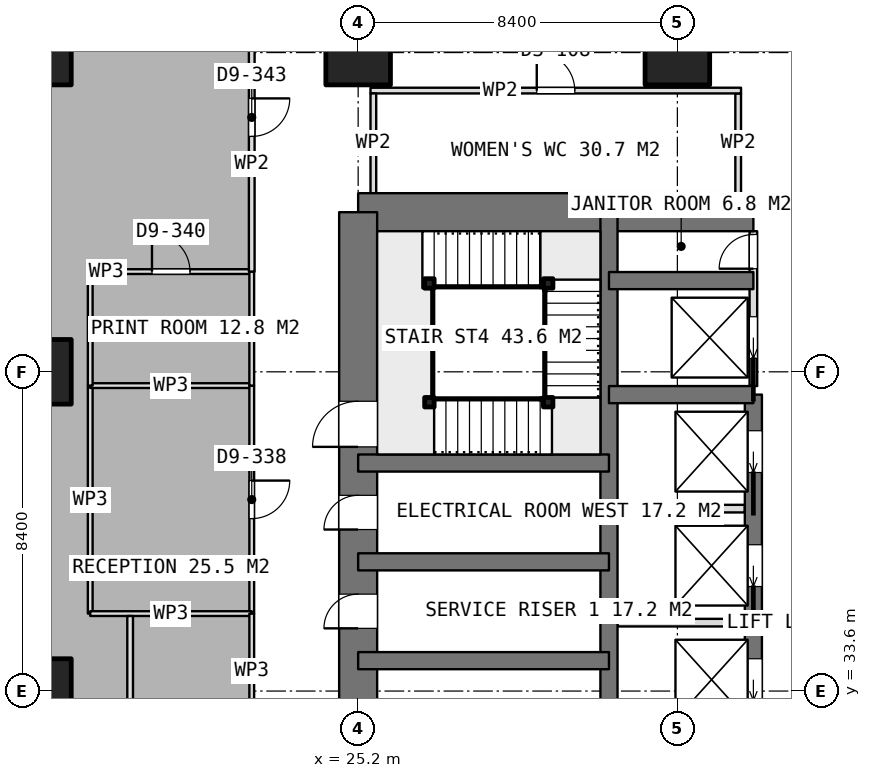
"""IFC4 building model, lengths in metres.
Left out: names, types, materials, properties, quantities, classifications, styles, units other than length and angle.
Written with IfcOpenShell. Run it as: python <this file> out.ifc"""

import sys

from ifc_helpers import new_model, si_unit, direction, frame, frame_2d, origin, origin_2d, place, context, subcontext, project, spatial, rectangle, extrude, element, fill, save


model = new_model("IFC4")
c1 = context("Model", 3, precision=1e-05, world=origin(), true_north=direction((0.0, 1.0)))
c2 = subcontext(c1, "Body", "Model", "MODEL_VIEW")
j1 = project(units=[si_unit("LENGTHUNIT", "METRE"), si_unit("PLANEANGLEUNIT", "RADIAN")], contexts=[c1])
p1 = place(None, origin())
s1 = spatial("IfcSite", under=j1, at=p1, CompositionType="ELEMENT")
p2 = place(p1, origin())
s2 = spatial("IfcBuilding", under=s1, at=p2, CompositionType="ELEMENT")
p3 = place(p2, frame((0.0, 0.0, 102.8)))
s3 = spatial("IfcBuildingStorey", under=s2, at=p3, CompositionType="ELEMENT", Elevation=102.8)
p4 = place(p3, frame((25.2, 46.2, 0.0), z_axis=(0.0, 0.0, 1.0), x_axis=(1.0, 0.0, 0.0)))
e1 = element("IfcWall", 1, at=p4, inside=s3, PredefinedType="SHEAR", context=c2, shape_type="SweptSolid", body=[
    extrude(rectangle(XDim=10.4, YDim=1.0, at=frame_2d((5.2, 0.0))), origin(), (0.0, 0.0, 1.0), 3.75),
])
p5 = place(p3, frame((25.2, 21.0, 0.0), z_axis=(0.0, 0.0, 1.0), x_axis=(0.0, 1.0, 0.0)))
e2 = element("IfcWall", 2, at=p5, inside=s3, PredefinedType="SHEAR", context=c2, shape_type="SweptSolid", body=[
    extrude(rectangle(XDim=25.2, YDim=1.0, at=frame_2d((12.6, 0.0))), origin(), (0.0, 0.0, 1.0), 3.75),
])
p6 = place(p5, frame((7.8, 0.0, 0.0)))
e3 = element("IfcOpeningElement", 3, at=p6, cuts=e2, PredefinedType="OPENING", context=c2, shape_type="SweptSolid", body=[
    extrude(rectangle(XDim=1.2, YDim=2.1, at=frame_2d((0.6, 1.05))), frame((0.0, 0.51, 0.0), z_axis=(0.0, -1.0, 0.0), x_axis=(1.0, 0.0, 0.0)), (0.0, 0.0, 1.0), 1.02),
])
p7 = place(p5, frame((14.25, 0.0, 0.0)))
e4 = element("IfcOpeningElement", 4, at=p7, cuts=e2, PredefinedType="OPENING", context=c2, shape_type="SweptSolid", body=[
    extrude(rectangle(XDim=0.9, YDim=2.1, at=frame_2d((0.45, 1.05))), frame((0.0, 0.51, 0.0), z_axis=(0.0, -1.0, 0.0), x_axis=(1.0, 0.0, 0.0)), (0.0, 0.0, 1.0), 1.02),
])
p8 = place(p5, frame((16.85, 0.0, 0.0)))
e5 = element("IfcOpeningElement", 5, at=p8, cuts=e2, PredefinedType="OPENING", context=c2, shape_type="SweptSolid", body=[
    extrude(rectangle(XDim=0.9, YDim=2.1, at=frame_2d((0.45, 1.05))), frame((0.0, 0.51, 0.0), z_axis=(0.0, -1.0, 0.0), x_axis=(1.0, 0.0, 0.0)), (0.0, 0.0, 1.0), 1.02),
])
p9 = place(p5, frame((19.025, 0.0, 0.0)))
e6 = element("IfcOpeningElement", 6, at=p9, cuts=e2, PredefinedType="OPENING", context=c2, shape_type="SweptSolid", body=[
    extrude(rectangle(XDim=1.2, YDim=2.1, at=frame_2d((0.6, 1.05))), frame((0.0, 0.51, 0.0), z_axis=(0.0, -1.0, 0.0), x_axis=(1.0, 0.0, 0.0)), (0.0, 0.0, 1.0), 1.02),
])
p10 = place(p3, frame((31.8, 21.0, 0.0), z_axis=(0.0, 0.0, 1.0), x_axis=(0.0, 1.0, 0.0)))
e7 = element("IfcWall", 7, at=p10, inside=s3, PredefinedType="SHEAR", context=c2, shape_type="SweptSolid", body=[
    extrude(rectangle(XDim=25.2, YDim=0.45, at=frame_2d((12.6, 0.0))), origin(), (0.0, 0.0, 1.0), 3.75),
])
p11 = place(p3, frame((35.6, 23.4, 0.0), z_axis=(0.0, 0.0, 1.0), x_axis=(0.0, 1.0, 0.0)))
e8 = element("IfcWall", 8, at=p11, inside=s3, PredefinedType="SHEAR", context=c2, shape_type="SweptSolid", body=[
    extrude(rectangle(XDim=18.0, YDim=0.45, at=frame_2d((9.0, 0.0))), origin(), (0.0, 0.0, 1.0), 3.75),
])
p12 = place(p11, frame((0.95, 0.0, 0.0)))
e9 = element("IfcOpeningElement", 9, at=p12, cuts=e8, PredefinedType="OPENING", context=c2, shape_type="SweptSolid", body=[
    extrude(rectangle(XDim=1.1, YDim=2.1, at=frame_2d((0.55, 1.05))), frame((0.0, 0.235, 0.0), z_axis=(0.0, -1.0, 0.0), x_axis=(1.0, 0.0, 0.0)), (0.0, 0.0, 1.0), 0.47),
])
p13 = place(p11, frame((3.95, 0.0, 0.0)))
e10 = element("IfcOpeningElement", 10, at=p13, cuts=e8, PredefinedType="OPENING", context=c2, shape_type="SweptSolid", body=[
    extrude(rectangle(XDim=1.1, YDim=2.1, at=frame_2d((0.55, 1.05))), frame((0.0, 0.235, 0.0), z_axis=(0.0, -1.0, 0.0), x_axis=(1.0, 0.0, 0.0)), (0.0, 0.0, 1.0), 0.47),
])
p14 = place(p11, frame((6.95, 0.0, 0.0)))
e11 = element("IfcOpeningElement", 11, at=p14, cuts=e8, PredefinedType="OPENING", context=c2, shape_type="SweptSolid", body=[
    extrude(rectangle(XDim=1.1, YDim=2.1, at=frame_2d((0.55, 1.05))), frame((0.0, 0.235, 0.0), z_axis=(0.0, -1.0, 0.0), x_axis=(1.0, 0.0, 0.0)), (0.0, 0.0, 1.0), 0.47),
])
p15 = place(p11, frame((9.95, 0.0, 0.0)))
e12 = element("IfcOpeningElement", 12, at=p15, cuts=e8, PredefinedType="OPENING", context=c2, shape_type="SweptSolid", body=[
    extrude(rectangle(XDim=1.1, YDim=2.1, at=frame_2d((0.55, 1.05))), frame((0.0, 0.235, 0.0), z_axis=(0.0, -1.0, 0.0), x_axis=(1.0, 0.0, 0.0)), (0.0, 0.0, 1.0), 0.47),
])
p16 = place(p11, frame((12.95, 0.0, 0.0)))
e13 = element("IfcOpeningElement", 13, at=p16, cuts=e8, PredefinedType="OPENING", context=c2, shape_type="SweptSolid", body=[
    extrude(rectangle(XDim=1.1, YDim=2.1, at=frame_2d((0.55, 1.05))), frame((0.0, 0.235, 0.0), z_axis=(0.0, -1.0, 0.0), x_axis=(1.0, 0.0, 0.0)), (0.0, 0.0, 1.0), 0.47),
])
p17 = place(p11, frame((15.95, 0.0, 0.0)))
e14 = element("IfcOpeningElement", 14, at=p17, cuts=e8, PredefinedType="OPENING", context=c2, shape_type="SweptSolid", body=[
    extrude(rectangle(XDim=1.1, YDim=2.1, at=frame_2d((0.55, 1.05))), frame((0.0, 0.235, 0.0), z_axis=(0.0, -1.0, 0.0), x_axis=(1.0, 0.0, 0.0)), (0.0, 0.0, 1.0), 0.47),
])
for number, where, z_axis, x_axis in (
    (15, (31.8, 41.4, 0.0), (0.0, 0.0, 1.0), (1.0, 0.0, 0.0)),
    (16, (31.8, 44.4, 0.0), (0.0, 0.0, 1.0), (1.0, 0.0, 0.0)),
):
    element("IfcWall", number, at=place(p3, frame(where, z_axis=z_axis, x_axis=x_axis)), inside=s3, PredefinedType="SHEAR", context=c2, shape_type="SweptSolid", body=[
        extrude(rectangle(XDim=3.8, YDim=0.45, at=frame_2d((1.9, 0.0))), origin(), (0.0, 0.0, 1.0), 3.75),
    ])
for number, where, z_axis, x_axis in (
    (17, (25.2, 34.4, 0.0), (0.0, 0.0, 1.0), (1.0, 0.0, 0.0)),
    (18, (25.2, 37.0, 0.0), (0.0, 0.0, 1.0), (1.0, 0.0, 0.0)),
    (19, (25.2, 39.6, 0.0), (0.0, 0.0, 1.0), (1.0, 0.0, 0.0)),
):
    element("IfcWall", number, at=place(p3, frame(where, z_axis=z_axis, x_axis=x_axis)), inside=s3, PredefinedType="SHEAR", context=c2, shape_type="SweptSolid", body=[
        extrude(rectangle(XDim=6.6, YDim=0.45, at=frame_2d((3.3, 0.0))), origin(), (0.0, 0.0, 1.0), 3.75),
    ])
for number, where, z_axis, x_axis in (
    (20, (16.8, 33.6, 0.0), (0.0, 0.0, 1.0), (1.0, 0.0, 0.0)),
    (21, (16.8, 42.0, 0.0), (0.0, 0.0, 1.0), (1.0, 0.0, 0.0)),
    (22, (16.8, 50.4, 0.0), (0.0, 0.0, 1.0), (1.0, 0.0, 0.0)),
    (23, (25.2, 50.4, 0.0), (0.0, 0.0, 1.0), (1.0, 0.0, 0.0)),
    (24, (33.6, 50.4, 0.0), (0.0, 0.0, 1.0), (1.0, 0.0, 0.0)),
):
    element("IfcColumn", number, at=place(p3, frame(where, z_axis=z_axis, x_axis=x_axis)), inside=s3, PredefinedType="COLUMN", context=c2, shape_type="SweptSolid", body=[
        extrude(rectangle(XDim=1.7, YDim=1.7, at=origin_2d()), origin(), (0.0, 0.0, 1.0), 3.75),
    ])
for number, where, z_axis, x_axis in (
    (25, (32.025, 35.4, 0.0), (0.0, 0.0, 1.0), (1.0, 0.0, 0.0)),
    (26, (32.025, 38.4, 0.0), (0.0, 0.0, 1.0), (1.0, 0.0, 0.0)),
):
    element("IfcWall", number, at=place(p3, frame(where, z_axis=z_axis, x_axis=x_axis)), inside=s3, PredefinedType="PARTITIONING", context=c2, shape_type="SweptSolid", body=[
        extrude(rectangle(XDim=3.35, YDim=0.2, at=frame_2d((1.675, 0.0))), origin(), (0.0, 0.0, 1.0), 3.5),
    ])
p18 = place(p3, frame((35.6, 41.625, 0.0), z_axis=(0.0, 0.0, 1.0), x_axis=(0.0, 1.0, 0.0)))
e27 = element("IfcWall", 27, at=p18, inside=s3, PredefinedType="PARTITIONING", context=c2, shape_type="SweptSolid", body=[
    extrude(rectangle(XDim=4.075, YDim=0.2, at=frame_2d((2.038, 0.0))), origin(), (0.0, 0.0, 1.0), 3.5),
])
p19 = place(p18, frame((3.088, 0.0, 0.0)))
e28 = element("IfcOpeningElement", 28, at=p19, cuts=e27, PredefinedType="OPENING", context=c2, shape_type="SweptSolid", body=[
    extrude(rectangle(XDim=0.9, YDim=2.1, at=frame_2d((0.45, 1.05))), frame((0.0, 0.11, 0.0), z_axis=(0.0, -1.0, 0.0), x_axis=(1.0, 0.0, 0.0)), (0.0, 0.0, 1.0), 0.22),
])
p20 = place(p18, frame((0.725, 0.0, 0.0)))
e29 = element("IfcOpeningElement", 29, at=p20, cuts=e27, PredefinedType="OPENING", context=c2, shape_type="SweptSolid", body=[
    extrude(rectangle(XDim=1.1, YDim=2.1, at=frame_2d((0.55, 1.05))), frame((0.0, 0.11, 0.0), z_axis=(0.0, -1.0, 0.0), x_axis=(1.0, 0.0, 0.0)), (0.0, 0.0, 1.0), 0.22),
])
p21 = place(p3, frame((25.525, 49.4, 0.0), z_axis=(0.0, 0.0, 1.0), x_axis=(1.0, 0.0, 0.0)))
e30 = element("IfcWall", 30, at=p21, inside=s3, PredefinedType="PARTITIONING", context=c2, shape_type="SweptSolid", body=[
    extrude(rectangle(XDim=9.75, YDim=0.15, at=frame_2d((4.875, 0.0))), origin(), (0.0, 0.0, 1.0), 3.5),
])
p22 = place(p21, frame((4.375, 0.0, 0.0)))
e31 = element("IfcOpeningElement", 31, at=p22, cuts=e30, PredefinedType="OPENING", context=c2, shape_type="SweptSolid", body=[
    extrude(rectangle(XDim=1.0, YDim=2.1, at=frame_2d((0.5, 1.05))), frame((0.0, 0.085, 0.0), z_axis=(0.0, -1.0, 0.0), x_axis=(1.0, 0.0, 0.0)), (0.0, 0.0, 1.0), 0.17),
])
for number, where, z_axis, x_axis in (
    (32, (25.6, 46.7, 0.0), (0.0, 0.0, 1.0), (0.0, 1.0, 0.0)),
    (33, (35.2, 46.7, 0.0), (0.0, 0.0, 1.0), (0.0, 1.0, 0.0)),
):
    element("IfcWall", number, at=place(p3, frame(where, z_axis=z_axis, x_axis=x_axis)), inside=s3, PredefinedType="PARTITIONING", context=c2, shape_type="SweptSolid", body=[
        extrude(rectangle(XDim=2.625, YDim=0.15, at=frame_2d((1.312, 0.0))), origin(), (0.0, 0.0, 1.0), 3.5),
    ])
p23 = place(p3, frame((18.15, 35.638, 0.0), z_axis=(0.0, 0.0, 1.0), x_axis=(0.0, 1.0, 0.0)))
e34 = element("IfcWall", 34, at=p23, inside=s3, PredefinedType="PARTITIONING", context=c2, shape_type="SweptSolid", body=[
    extrude(rectangle(XDim=5.999, YDim=0.125, at=frame_2d((3.0, 0.0))), origin(), (0.0, 0.0, 1.0), 3.5),
])
p24 = place(p3, frame((18.15, 41.637, 0.0), z_axis=(0.0, 0.0, 1.0), x_axis=(1.0, 0.0, 0.0)))
e35 = element("IfcWall", 35, at=p24, inside=s3, PredefinedType="PARTITIONING", context=c2, shape_type="SweptSolid", body=[
    extrude(rectangle(XDim=4.25, YDim=0.125, at=frame_2d((2.125, 0.0))), origin(), (0.0, 0.0, 1.0), 3.5),
])
p25 = place(p3, frame((22.4, 41.637, 0.0), z_axis=(0.0, 0.0, 1.0), x_axis=(0.0, -1.0, 0.0)))
e36 = element("IfcWall", 36, at=p25, inside=s3, PredefinedType="PARTITIONING", context=c2, shape_type="SweptSolid", body=[
    extrude(rectangle(XDim=5.999, YDim=0.125, at=frame_2d((3.0, 0.0))), origin(), (0.0, 0.0, 1.0), 3.5),
])
p26 = place(p25, frame((2.499, 0.0, 0.0)))
e37 = element("IfcOpeningElement", 37, at=p26, cuts=e36, PredefinedType="OPENING", context=c2, shape_type="SweptSolid", body=[
    extrude(rectangle(XDim=1.0, YDim=2.1, at=frame_2d((0.5, 1.05))), frame((0.0, 0.073, 0.0), z_axis=(0.0, -1.0, 0.0), x_axis=(1.0, 0.0, 0.0)), (0.0, 0.0, 1.0), 0.145),
])
p27 = place(p3, frame((22.4, 35.638, 0.0), z_axis=(0.0, 0.0, 1.0), x_axis=(-1.0, 0.0, 0.0)))
e38 = element("IfcWall", 38, at=p27, inside=s3, PredefinedType="PARTITIONING", context=c2, shape_type="SweptSolid", body=[
    extrude(rectangle(XDim=4.25, YDim=0.125, at=frame_2d((2.125, 0.0))), origin(), (0.0, 0.0, 1.0), 3.5),
])
p28 = place(p3, frame((18.15, 41.637, 0.0), z_axis=(0.0, 0.0, 1.0), x_axis=(0.0, 1.0, 0.0)))
e39 = element("IfcWall", 39, at=p28, inside=s3, PredefinedType="PARTITIONING", context=c2, shape_type="SweptSolid", body=[
    extrude(rectangle(XDim=3.0, YDim=0.125, at=frame_2d((1.5, 0.0))), origin(), (0.0, 0.0, 1.0), 3.5),
])
p29 = place(p3, frame((18.15, 44.637, 0.0), z_axis=(0.0, 0.0, 1.0), x_axis=(1.0, 0.0, 0.0)))
e40 = element("IfcWall", 40, at=p29, inside=s3, PredefinedType="PARTITIONING", context=c2, shape_type="SweptSolid", body=[
    extrude(rectangle(XDim=4.25, YDim=0.125, at=frame_2d((2.125, 0.0))), origin(), (0.0, 0.0, 1.0), 3.5),
])
p30 = place(p29, frame((1.625, 0.0, 0.0)))
e41 = element("IfcOpeningElement", 41, at=p30, cuts=e40, PredefinedType="OPENING", context=c2, shape_type="SweptSolid", body=[
    extrude(rectangle(XDim=1.0, YDim=2.1, at=frame_2d((0.5, 1.05))), frame((0.0, 0.073, 0.0), z_axis=(0.0, -1.0, 0.0), x_axis=(1.0, 0.0, 0.0)), (0.0, 0.0, 1.0), 0.145),
])
p31 = place(p3, frame((22.4, 44.637, 0.0), z_axis=(0.0, 0.0, 1.0), x_axis=(0.0, -1.0, 0.0)))
e42 = element("IfcWall", 42, at=p31, inside=s3, PredefinedType="PARTITIONING", context=c2, shape_type="SweptSolid", body=[
    extrude(rectangle(XDim=3.0, YDim=0.125, at=frame_2d((1.5, 0.0))), origin(), (0.0, 0.0, 1.0), 3.5),
])
p32 = place(p3, frame((22.4, 52.75, 0.0), z_axis=(0.0, 0.0, 1.0), x_axis=(0.0, -1.0, 0.0)))
e43 = element("IfcWall", 43, at=p32, inside=s3, PredefinedType="PARTITIONING", context=c2, shape_type="SweptSolid", body=[
    extrude(rectangle(XDim=8.113, YDim=0.15, at=frame_2d((4.057, 0.0))), origin(), (0.0, 0.0, 1.0), 3.5),
])
p33 = place(p32, frame((3.556, 0.0, 0.0)))
e44 = element("IfcOpeningElement", 44, at=p33, cuts=e43, PredefinedType="OPENING", context=c2, shape_type="SweptSolid", body=[
    extrude(rectangle(XDim=1.0, YDim=2.1, at=frame_2d((0.5, 1.05))), frame((0.0, 0.085, 0.0), z_axis=(0.0, -1.0, 0.0), x_axis=(1.0, 0.0, 0.0)), (0.0, 0.0, 1.0), 0.17),
])
p34 = place(p3, frame((19.2, 35.575, 0.0), z_axis=(0.0, 0.0, 1.0), x_axis=(0.0, -1.0, 0.0)))
e45 = element("IfcWall", 45, at=p34, inside=s3, PredefinedType="PARTITIONING", context=c2, shape_type="SweptSolid", body=[
    extrude(rectangle(XDim=7.65, YDim=0.15, at=frame_2d((3.825, 0.0))), origin(), (0.0, 0.0, 1.0), 3.5),
])
p35 = place(p3, frame((22.4, 35.637, 0.0), z_axis=(0.0, 0.0, 1.0), x_axis=(0.0, -1.0, 0.0)))
e46 = element("IfcWall", 46, at=p35, inside=s3, PredefinedType="PARTITIONING", context=c2, shape_type="SweptSolid", body=[
    extrude(rectangle(XDim=7.562, YDim=0.125, at=frame_2d((3.781, 0.0))), origin(), (0.0, 0.0, 1.0), 3.5),
])
p36 = place(p35, frame((3.319, 0.0, 0.0)))
e47 = element("IfcOpeningElement", 47, at=p36, cuts=e46, PredefinedType="OPENING", context=c2, shape_type="SweptSolid", body=[
    extrude(rectangle(XDim=1.0, YDim=2.1, at=frame_2d((0.5, 1.05))), frame((0.0, 0.073, 0.0), z_axis=(0.0, -1.0, 0.0), x_axis=(1.0, 0.0, 0.0)), (0.0, 0.0, 1.0), 0.145),
])
for number, where, z_axis, x_axis in (
    (48, (27.075, 41.2, 0.0), (0.0, 0.0, 1.0), (1.0, 0.0, 0.0)),
    (49, (30.2, 41.2, 0.0), (0.0, 0.0, 1.0), (1.0, 0.0, 0.0)),
    (50, (30.2, 44.325, 0.0), (0.0, 0.0, 1.0), (1.0, 0.0, 0.0)),
    (51, (27.075, 44.325, 0.0), (0.0, 0.0, 1.0), (1.0, 0.0, 0.0)),
):
    element("IfcColumn", number, at=place(p3, frame(where, z_axis=z_axis, x_axis=x_axis)), inside=s3, PredefinedType="COLUMN", context=c2, shape_type="SweptSolid", body=[
        extrude(rectangle(XDim=0.25, YDim=0.25, at=origin_2d()), origin(), (0.0, 0.0, 1.0), 3.75),
    ])
p37 = place(p7, origin())
e52 = element("IfcDoor", 52, at=p37, inside=s3, OperationType="SINGLE_SWING_LEFT", PredefinedType="DOOR", context=c2, shape_type="SweptSolid", body=[
    extrude(rectangle(XDim=0.9, YDim=2.1, at=frame_2d((0.45, 1.05))), frame((0.0, 0.025, 0.0), z_axis=(0.0, -1.0, 0.0), x_axis=(1.0, 0.0, 0.0)), (0.0, 0.0, 1.0), 0.05),
])
fill(e4, e52)
p38 = place(p8, origin())
e53 = element("IfcDoor", 53, at=p38, inside=s3, OperationType="SINGLE_SWING_LEFT", PredefinedType="DOOR", context=c2, shape_type="SweptSolid", body=[
    extrude(rectangle(XDim=0.9, YDim=2.1, at=frame_2d((0.45, 1.05))), frame((0.0, 0.025, 0.0), z_axis=(0.0, -1.0, 0.0), x_axis=(1.0, 0.0, 0.0)), (0.0, 0.0, 1.0), 0.05),
])
fill(e5, e53)
p39 = place(p19, origin())
e54 = element("IfcDoor", 54, at=p39, inside=s3, OperationType="SINGLE_SWING_LEFT", PredefinedType="DOOR", context=c2, shape_type="SweptSolid", body=[
    extrude(rectangle(XDim=0.9, YDim=2.1, at=frame_2d((0.45, 1.05))), frame((0.0, 0.025, 0.0), z_axis=(0.0, -1.0, 0.0), x_axis=(1.0, 0.0, 0.0)), (0.0, 0.0, 1.0), 0.05),
])
fill(e28, e54)
p40 = place(p15, origin())
e55 = element("IfcDoor", 55, at=p40, inside=s3, OperationType="SLIDING_TO_LEFT", PredefinedType="USERDEFINED", context=c2, shape_type="SweptSolid", body=[
    extrude(rectangle(XDim=1.1, YDim=2.1, at=frame_2d((0.55, 1.05))), frame((0.0, 0.025, 0.0), z_axis=(0.0, -1.0, 0.0), x_axis=(1.0, 0.0, 0.0)), (0.0, 0.0, 1.0), 0.05),
])
fill(e12, e55)
p41 = place(p16, origin())
e56 = element("IfcDoor", 56, at=p41, inside=s3, OperationType="SLIDING_TO_LEFT", PredefinedType="USERDEFINED", context=c2, shape_type="SweptSolid", body=[
    extrude(rectangle(XDim=1.1, YDim=2.1, at=frame_2d((0.55, 1.05))), frame((0.0, 0.025, 0.0), z_axis=(0.0, -1.0, 0.0), x_axis=(1.0, 0.0, 0.0)), (0.0, 0.0, 1.0), 0.05),
])
fill(e13, e56)
p42 = place(p17, origin())
e57 = element("IfcDoor", 57, at=p42, inside=s3, OperationType="SLIDING_TO_LEFT", PredefinedType="USERDEFINED", context=c2, shape_type="SweptSolid", body=[
    extrude(rectangle(XDim=1.1, YDim=2.1, at=frame_2d((0.55, 1.05))), frame((0.0, 0.025, 0.0), z_axis=(0.0, -1.0, 0.0), x_axis=(1.0, 0.0, 0.0)), (0.0, 0.0, 1.0), 0.05),
])
fill(e14, e57)
p43 = place(p20, origin())
e58 = element("IfcDoor", 58, at=p43, inside=s3, OperationType="SLIDING_TO_LEFT", PredefinedType="USERDEFINED", context=c2, shape_type="SweptSolid", body=[
    extrude(rectangle(XDim=1.1, YDim=2.1, at=frame_2d((0.55, 1.05))), frame((0.0, 0.025, 0.0), z_axis=(0.0, -1.0, 0.0), x_axis=(1.0, 0.0, 0.0)), (0.0, 0.0, 1.0), 0.05),
])
fill(e29, e58)
p44 = place(p22, origin())
e59 = element("IfcDoor", 59, at=p44, inside=s3, OperationType="SINGLE_SWING_LEFT", PredefinedType="DOOR", context=c2, shape_type="SweptSolid", body=[
    extrude(rectangle(XDim=1.0, YDim=2.1, at=frame_2d((0.5, 1.05))), frame((0.0, 0.025, 0.0), z_axis=(0.0, -1.0, 0.0), x_axis=(1.0, 0.0, 0.0)), (0.0, 0.0, 1.0), 0.05),
])
fill(e31, e59)
p45 = place(p26, origin())
e60 = element("IfcDoor", 60, at=p45, inside=s3, OperationType="SINGLE_SWING_LEFT", PredefinedType="DOOR", context=c2, shape_type="SweptSolid", body=[
    extrude(rectangle(XDim=1.0, YDim=2.1, at=frame_2d((0.5, 1.05))), frame((0.0, 0.025, 0.0), z_axis=(0.0, -1.0, 0.0), x_axis=(1.0, 0.0, 0.0)), (0.0, 0.0, 1.0), 0.05),
])
fill(e37, e60)
p46 = place(p30, origin())
e61 = element("IfcDoor", 61, at=p46, inside=s3, OperationType="SINGLE_SWING_LEFT", PredefinedType="DOOR", context=c2, shape_type="SweptSolid", body=[
    extrude(rectangle(XDim=1.0, YDim=2.1, at=frame_2d((0.5, 1.05))), frame((0.0, 0.025, 0.0), z_axis=(0.0, -1.0, 0.0), x_axis=(1.0, 0.0, 0.0)), (0.0, 0.0, 1.0), 0.05),
])
fill(e41, e61)
p47 = place(p33, origin())
e62 = element("IfcDoor", 62, at=p47, inside=s3, OperationType="SINGLE_SWING_LEFT", PredefinedType="DOOR", context=c2, shape_type="SweptSolid", body=[
    extrude(rectangle(XDim=1.0, YDim=2.1, at=frame_2d((0.5, 1.05))), frame((0.0, 0.025, 0.0), z_axis=(0.0, -1.0, 0.0), x_axis=(1.0, 0.0, 0.0)), (0.0, 0.0, 1.0), 0.05),
])
fill(e44, e62)
p48 = place(p9, origin())
e63 = element("IfcDoor", 63, at=p48, inside=s3, OperationType="SINGLE_SWING_RIGHT", PredefinedType="DOOR", context=c2, shape_type="SweptSolid", body=[
    extrude(rectangle(XDim=1.2, YDim=2.1, at=frame_2d((0.6, 1.05))), frame((0.0, 0.025, 0.0), z_axis=(0.0, -1.0, 0.0), x_axis=(1.0, 0.0, 0.0)), (0.0, 0.0, 1.0), 0.05),
])
fill(e6, e63)
save(model, sys.argv[1])
